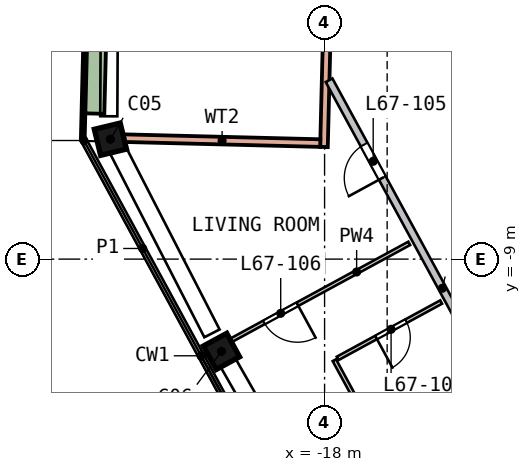
"""IFC4 building model, lengths in metres.
Left out: names, types, materials, properties, quantities, classifications, styles, units other than length and angle.
Written with IfcOpenShell. Run it as: python <this file> out.ifc"""

import sys

from ifc_helpers import new_model, si_unit, direction, frame, frame_2d, origin, origin_2d, place, context, subcontext, project, spatial, rectangle, extrude, element, fill, save


model = new_model("IFC4")
c1 = context("Model", 3, precision=1e-05, world=origin(), true_north=direction((0.0, 1.0)))
c2 = subcontext(c1, "Body", "Model", "MODEL_VIEW")
j1 = project(units=[si_unit("LENGTHUNIT", "METRE"), si_unit("PLANEANGLEUNIT", "RADIAN")], contexts=[c1])
p1 = place(None, origin())
s1 = spatial("IfcSite", under=j1, at=p1, CompositionType="ELEMENT")
p2 = place(p1, origin())
s2 = spatial("IfcBuilding", under=s1, at=p2, CompositionType="ELEMENT")
p3 = place(p2, frame((0.0, 0.0, 274.0)))
s3 = spatial("IfcBuildingStorey", under=s2, at=p3, CompositionType="ELEMENT", Elevation=274.0)
p4 = place(p3, frame((-23.669, -5.709, 0.0), z_axis=(0.028051466, -0.112281885, 0.99328037), x_axis=(-0.232561936, 0.965671679, 0.115728794)))
e1 = element("IfcColumn", 1, at=p4, inside=s3, PredefinedType="COLUMN", context=c2, shape_type="SweptSolid", body=[
    extrude(rectangle(XDim=0.7, YDim=0.7, at=origin_2d()), origin(), (0.0, 0.0, 1.0), 3.211),
])
p5 = place(p3, frame((-20.78, -11.311, 0.0), z_axis=(0.054678505, -0.0984061, 0.993643045), x_axis=(0.475225292, -0.872632983, -0.112572636)))
e2 = element("IfcColumn", 2, at=p5, inside=s3, PredefinedType="COLUMN", context=c2, shape_type="SweptSolid", body=[
    extrude(rectangle(XDim=0.7, YDim=0.7, at=origin_2d()), origin(), (0.0, 0.0, 1.0), 3.21),
])
p6 = place(p3, frame((-18.016, -6.049, 0.0), z_axis=(0.0, 0.0, 1.0), x_axis=(0.025127793, 0.999684247, 0.0)))
e3 = element("IfcWall", 3, at=p6, inside=s3, PredefinedType="SOLIDWALL", context=c2, shape_type="SweptSolid", body=[
    extrude(rectangle(XDim=13.0, YDim=0.2, at=frame_2d((6.5, 0.0))), origin(), (0.0, 0.0, 1.0), 3.19),
])
p7 = place(p6, frame((5.6, 0.0, 0.0)))
e4 = element("IfcOpeningElement", 4, at=p7, cuts=e3, PredefinedType="OPENING", context=c2, shape_type="SweptSolid", body=[
    extrude(rectangle(XDim=1.8, YDim=2.4, at=frame_2d((0.9, 1.2))), frame((0.0, 0.11, 0.0), z_axis=(0.0, -1.0, 0.0), x_axis=(1.0, 0.0, 0.0)), (0.0, 0.0, 1.0), 0.22),
])
p8 = place(p3, frame((-23.28, -5.817, 0.0), z_axis=(0.0, 0.0, 1.0), x_axis=(0.999684155, -0.025131461, 0.0)))
e5 = element("IfcWall", 5, at=p8, inside=s3, PredefinedType="SOLIDWALL", context=c2, shape_type="SweptSolid", body=[
    extrude(rectangle(XDim=5.168, YDim=0.2, at=frame_2d((2.584, 0.0))), origin(), (0.0, 0.0, 1.0), 3.19),
])
p9 = place(p3, frame((-24.039, 7.026, 0.0), z_axis=(0.0, 0.0, 1.0), x_axis=(-0.025136608, -0.999684026, 0.0)))
e6 = element("IfcWall", 6, at=p9, inside=s3, PredefinedType="SOLIDWALL", context=c2, shape_type="SweptSolid", body=[
    extrude(rectangle(XDim=12.84, YDim=0.1, at=frame_2d((6.42, 0.0))), origin(), (0.0, 0.0, 1.0), 0.7),
])
p10 = place(p3, frame((-23.921, -0.21, 0.0), z_axis=(0.0, 0.0, 1.0), x_axis=(-0.0251434, -0.999683855, 0.0)))
e7 = element("IfcWall", 7, at=p10, inside=s3, PredefinedType="SOLIDWALL", context=c2, shape_type="SweptSolid", body=[
    extrude(rectangle(XDim=4.962, YDim=0.5, at=frame_2d((2.481, 0.0))), origin(), (0.0, 0.0, 1.0), 0.7),
])
p11 = place(p3, frame((-13.418, -12.493, 0.0), z_axis=(0.0, 0.0, 1.0), x_axis=(-0.478080636, 0.878315948, 0.0)))
e8 = element("IfcWall", 8, at=p11, inside=s3, PredefinedType="SOLIDWALL", context=c2, shape_type="SweptSolid", body=[
    extrude(rectangle(XDim=9.337, YDim=0.2, at=frame_2d((4.668, 0.0))), origin(), (0.0, 0.0, 1.0), 3.19),
])
p12 = place(p11, frame((6.408, 0.0, 0.0)))
e9 = element("IfcOpeningElement", 9, at=p12, cuts=e8, PredefinedType="OPENING", context=c2, shape_type="SweptSolid", body=[
    extrude(rectangle(XDim=1.0, YDim=2.1, at=frame_2d((0.5, 1.05))), frame((0.0, 0.11, 0.0), z_axis=(0.0, -1.0, 0.0), x_axis=(1.0, 0.0, 0.0)), (0.0, 0.0, 1.0), 0.22),
])
p13 = place(p3, frame((-15.773, -8.585, 0.0), z_axis=(0.0, 0.0, 1.0), x_axis=(-0.878315476, -0.478081504, 0.0)))
e10 = element("IfcWall", 10, at=p13, inside=s3, PredefinedType="PARTITIONING", context=c2, shape_type="SweptSolid", body=[
    extrude(rectangle(XDim=6.15, YDim=0.1, at=frame_2d((3.075, 0.0))), origin(), (0.0, 0.0, 1.0), 3.19),
])
p14 = place(p13, frame((3.35, 0.0, 0.0)))
e11 = element("IfcOpeningElement", 11, at=p14, cuts=e10, PredefinedType="OPENING", context=c2, shape_type="SweptSolid", body=[
    extrude(rectangle(XDim=1.0, YDim=2.1, at=frame_2d((0.5, 1.05))), frame((0.0, 0.06, 0.0), z_axis=(0.0, -1.0, 0.0), x_axis=(1.0, 0.0, 0.0)), (0.0, 0.0, 1.0), 0.12),
])
p15 = place(p3, frame((-17.743, -11.66, 0.0), z_axis=(0.0, 0.0, 1.0), x_axis=(0.478053023, -0.878330978, 0.0)))
e12 = element("IfcWall", 12, at=p15, inside=s3, PredefinedType="PARTITIONING", context=c2, shape_type="SweptSolid", body=[
    extrude(rectangle(XDim=3.704, YDim=0.1, at=frame_2d((1.852, 0.0))), origin(), (0.0, 0.0, 1.0), 3.19),
])
p16 = place(p3, frame((-14.933, -10.13, 0.0), z_axis=(0.0, 0.0, 1.0), x_axis=(-0.87832263, -0.478068361, 0.0)))
e13 = element("IfcWall", 13, at=p16, inside=s3, PredefinedType="PARTITIONING", context=c2, shape_type="SweptSolid", body=[
    extrude(rectangle(XDim=3.1, YDim=0.1, at=frame_2d((1.55, 0.0))), origin(), (0.0, 0.0, 1.0), 3.19),
])
p17 = place(p16, frame((1.05, 0.0, 0.0)))
e14 = element("IfcOpeningElement", 14, at=p17, cuts=e13, PredefinedType="OPENING", context=c2, shape_type="SweptSolid", body=[
    extrude(rectangle(XDim=0.9, YDim=2.1, at=frame_2d((0.45, 1.05))), frame((0.0, 0.06, 0.0), z_axis=(0.0, -1.0, 0.0), x_axis=(1.0, 0.0, 0.0)), (0.0, 0.0, 1.0), 0.12),
])
p18 = place(p12, origin())
e15 = element("IfcDoor", 15, at=p18, inside=s3, OperationType="SINGLE_SWING_LEFT", PredefinedType="DOOR", context=c2, shape_type="SweptSolid", body=[
    extrude(rectangle(XDim=1.0, YDim=2.1, at=frame_2d((0.5, 1.05))), frame((0.0, 0.025, 0.0), z_axis=(0.0, -1.0, 0.0), x_axis=(1.0, 0.0, 0.0)), (0.0, 0.0, 1.0), 0.05),
])
fill(e9, e15)
p19 = place(p14, origin())
e16 = element("IfcDoor", 16, at=p19, inside=s3, OperationType="SINGLE_SWING_LEFT", PredefinedType="DOOR", context=c2, shape_type="SweptSolid", body=[
    extrude(rectangle(XDim=1.0, YDim=2.1, at=frame_2d((0.5, 1.05))), frame((0.0, 0.025, 0.0), z_axis=(0.0, -1.0, 0.0), x_axis=(1.0, 0.0, 0.0)), (0.0, 0.0, 1.0), 0.05),
])
fill(e11, e16)
p20 = place(p17, origin())
e17 = element("IfcDoor", 17, at=p20, inside=s3, OperationType="SINGLE_SWING_RIGHT", PredefinedType="DOOR", context=c2, shape_type="SweptSolid", body=[
    extrude(rectangle(XDim=0.9, YDim=2.1, at=frame_2d((0.45, 1.05))), frame((0.0, 0.025, 0.0), z_axis=(0.0, -1.0, 0.0), x_axis=(1.0, 0.0, 0.0)), (0.0, 0.0, 1.0), 0.05),
])
fill(e14, e17)
save(model, sys.argv[1])
